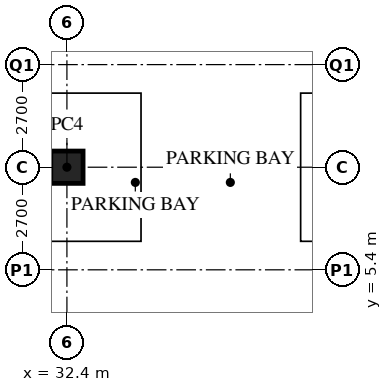
"""IFC4 building model, lengths in metres.
Left out: names, types, materials, properties, quantities, classifications, styles, units other than length and angle.
Written with IfcOpenShell. Run it as: python <this file> out.ifc"""

import sys

from ifc_helpers import new_model, si_unit, direction, frame, origin, origin_2d, place, context, subcontext, project, spatial, hollow_rectangle, extrude, element, save


model = new_model("IFC4")
c1 = context("Model", 3, precision=1e-05, world=origin(), true_north=direction((0.0, 1.0)))
c2 = subcontext(c1, "Body", "Model", "MODEL_VIEW")
j1 = project(units=[si_unit("LENGTHUNIT", "METRE"), si_unit("PLANEANGLEUNIT", "RADIAN")], contexts=[c1])
p1 = place(None, origin())
s1 = spatial("IfcSite", under=j1, at=p1, CompositionType="ELEMENT")
p2 = place(p1, origin())
s2 = spatial("IfcBuilding", under=s1, at=p2, CompositionType="ELEMENT")
p3 = place(p2, frame((0.0, 0.0, -8.4)))
s3 = spatial("IfcBuildingStorey", under=s2, at=p3, CompositionType="ELEMENT", Elevation=-8.4)
p4 = place(p3, frame((32.4, 8.1, 0.0), z_axis=(0.0, 0.0, 1.0), x_axis=(1.0, 0.0, 0.0)))
e1 = element("IfcColumn", 1, at=p4, inside=s3, PredefinedType="COLUMN", context=c2, shape_type="SweptSolid", body=[
    extrude(hollow_rectangle(XDim=0.85, YDim=0.85, WallThickness=0.085, at=origin_2d()), origin(), (0.0, 0.0, 1.0), 4.2),
])
save(model, sys.argv[1])
